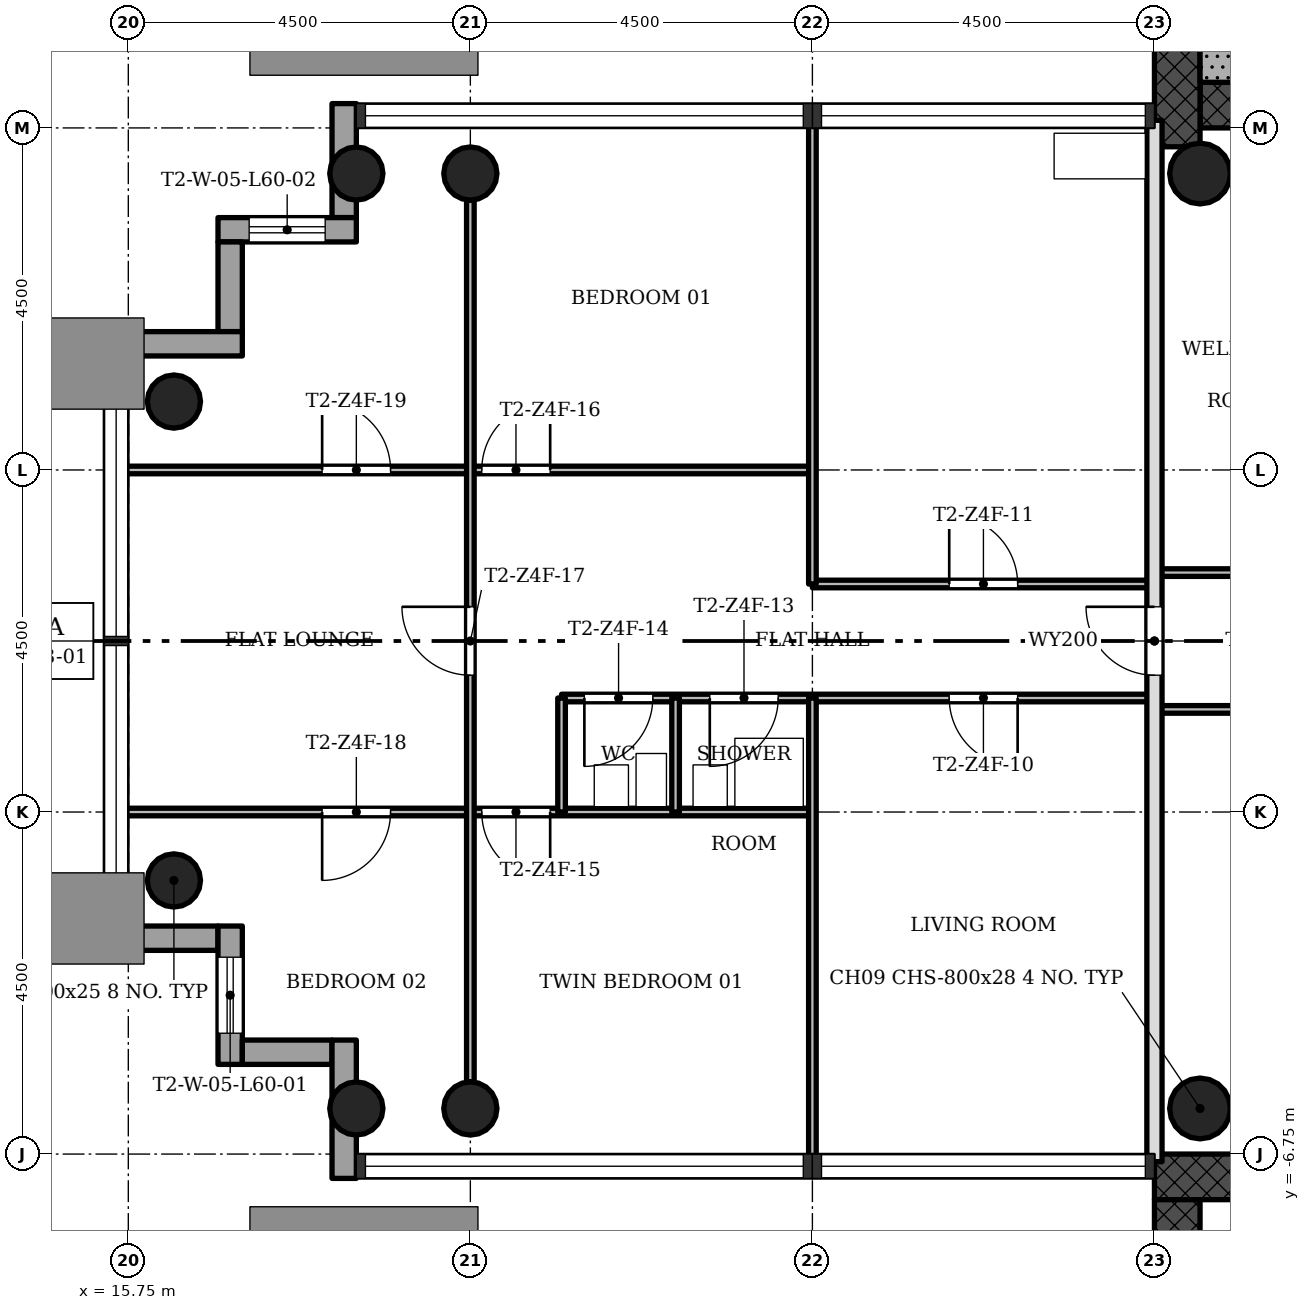
"""IFC4 building model, lengths in metres.
Left out: names, types, materials, properties, quantities, classifications, styles, units other than length and angle.
Written with IfcOpenShell. Run it as: python <this file> out.ifc"""

import sys

from ifc_helpers import new_model, si_unit, direction, frame, frame_2d, origin, origin_2d, place, context, subcontext, project, spatial, rectangle, hollow_circle, extrude, element, fill, save


model = new_model("IFC4")
c1 = context("Model", 3, precision=1e-05, world=origin(), true_north=direction((0.0, 1.0)))
c2 = subcontext(c1, "Body", "Model", "MODEL_VIEW")
j1 = project(units=[si_unit("LENGTHUNIT", "METRE"), si_unit("PLANEANGLEUNIT", "RADIAN")], contexts=[c1])
p1 = place(None, origin())
s1 = spatial("IfcSite", under=j1, at=p1, CompositionType="ELEMENT")
p2 = place(p1, origin())
s2 = spatial("IfcBuilding", under=s1, at=p2, CompositionType="ELEMENT")
p3 = place(p2, frame((0.0, 0.0, 216.4)))
s3 = spatial("IfcBuildingStorey", under=s2, at=p3, CompositionType="ELEMENT", Elevation=216.4)
p4 = place(p3, frame((29.85, 7.05, 0.0), z_axis=(0.0, 0.0, 1.0), x_axis=(1.0, 0.0, 0.0)))
e1 = element("IfcWall", 1, at=p4, inside=s3, PredefinedType="SHEAR", context=c2, shape_type="SweptSolid", body=[
    extrude(rectangle(XDim=12.9, YDim=0.6, at=frame_2d((6.45, 0.0))), origin(), (0.0, 0.0, 1.0), 3.4),
])
p5 = place(p4, frame((5.25, 0.0, 0.0)))
e2 = element("IfcOpeningElement", 2, at=p5, cuts=e1, PredefinedType="OPENING", context=c2, shape_type="SweptSolid", body=[
    extrude(rectangle(XDim=1.8, YDim=2.1, at=frame_2d((0.9, 1.05))), frame((0.0, 0.31, 0.0), z_axis=(0.0, -1.0, 0.0), x_axis=(1.0, 0.0, 0.0)), (0.0, 0.0, 1.0), 0.62),
])
p6 = place(p3, frame((29.55, 15.15, 0.0), z_axis=(0.0, 0.0, 1.0), x_axis=(0.0, -1.0, 0.0)))
e3 = element("IfcWall", 3, at=p6, inside=s3, PredefinedType="SHEAR", context=c2, shape_type="SweptSolid", body=[
    extrude(rectangle(XDim=8.648, YDim=0.6, at=frame_2d((4.324, 0.0))), origin(), (0.0, 0.0, 1.0), 3.4),
])
p7 = place(p3, frame((42.15, -7.05, 0.0), z_axis=(0.0, 0.0, 1.0), x_axis=(-1.0, 0.0, 0.0)))
e4 = element("IfcWall", 4, at=p7, inside=s3, PredefinedType="SHEAR", context=c2, shape_type="SweptSolid", body=[
    extrude(rectangle(XDim=12.9, YDim=0.6, at=frame_2d((6.45, 0.0))), origin(), (0.0, 0.0, 1.0), 3.4),
])
p8 = place(p7, frame((5.25, 0.0, 0.0)))
e5 = element("IfcOpeningElement", 5, at=p8, cuts=e4, PredefinedType="OPENING", context=c2, shape_type="SweptSolid", body=[
    extrude(rectangle(XDim=1.8, YDim=2.1, at=frame_2d((0.9, 1.05))), frame((0.0, 0.31, 0.0), z_axis=(0.0, -1.0, 0.0), x_axis=(1.0, 0.0, 0.0)), (0.0, 0.0, 1.0), 0.62),
])
p9 = place(p3, frame((29.55, -7.35, 0.0), z_axis=(0.0, 0.0, 1.0), x_axis=(0.0, -1.0, 0.0)))
e6 = element("IfcWall", 6, at=p9, inside=s3, PredefinedType="SHEAR", context=c2, shape_type="SweptSolid", body=[
    extrude(rectangle(XDim=8.4, YDim=0.6, at=frame_2d((4.2, 0.0))), origin(), (0.0, 0.0, 1.0), 3.4),
])
for number, where, z_axis, x_axis in (
    (7, (20.25, 6.15, 0.0), (0.0, 0.0, 1.0), (1.0, 0.0, 0.0)),
    (8, (20.25, -6.15, 0.0), (0.0, 0.0, 1.0), (1.0, 0.0, 0.0)),
    (9, (18.75, 6.15, 0.0), (0.0, 0.0, 1.0), (1.0, 0.0, 0.0)),
    (10, (18.75, -6.15, 0.0), (0.0, 0.0, 1.0), (1.0, 0.0, 0.0)),
    (11, (16.35, 3.15, 0.0), (0.0, 0.0, 1.0), (1.0, 0.0, 0.0)),
    (12, (16.35, -3.15, 0.0), (0.0, 0.0, 1.0), (1.0, 0.0, 0.0)),
):
    element("IfcColumn", number, at=place(p3, frame(where, z_axis=z_axis, x_axis=x_axis)), inside=s3, PredefinedType="COLUMN", context=c2, shape_type="SweptSolid", body=[
        extrude(hollow_circle(Radius=0.35, WallThickness=0.025, at=origin_2d()), origin(), (0.0, 0.0, 1.0), 3.4),
    ])
for number, where, z_axis, x_axis in (
    (13, (29.85, 6.15, 0.0), (0.0, 0.0, 1.0), (1.0, 0.0, 0.0)),
    (14, (29.85, -6.15, 0.0), (0.0, 0.0, 1.0), (1.0, 0.0, 0.0)),
):
    element("IfcColumn", number, at=place(p3, frame(where, z_axis=z_axis, x_axis=x_axis)), inside=s3, PredefinedType="COLUMN", context=c2, shape_type="SweptSolid", body=[
        extrude(hollow_circle(Radius=0.4, WallThickness=0.028, at=origin_2d()), origin(), (0.0, 0.0, 1.0), 3.4),
    ])
p10 = place(p3, frame((18.59, 7.07, -0.3), z_axis=(0.0, 0.0, 1.0), x_axis=(0.0, -1.0, 0.0)))
e15 = element("IfcWall", 15, at=p10, inside=s3, PredefinedType="STANDARD", context=c2, shape_type="SweptSolid", body=[
    extrude(rectangle(XDim=1.5, YDim=0.32, at=frame_2d((0.75, 0.0))), origin(), (0.0, 0.0, 1.0), 3.4),
])
p11 = place(p3, frame((18.75, 5.41, -0.3), z_axis=(0.0, 0.0, 1.0), x_axis=(-1.0, 0.0, 0.0)))
e16 = element("IfcWall", 16, at=p11, inside=s3, PredefinedType="STANDARD", context=c2, shape_type="SweptSolid", body=[
    extrude(rectangle(XDim=1.82, YDim=0.32, at=frame_2d((0.91, 0.0))), origin(), (0.0, 0.0, 1.0), 3.4),
])
p12 = place(p11, frame((0.41, 0.0, 1.2)))
e17 = element("IfcOpeningElement", 17, at=p12, cuts=e16, PredefinedType="OPENING", context=c2, shape_type="SweptSolid", body=[
    extrude(rectangle(XDim=1.0, YDim=1.5, at=frame_2d((0.5, 0.75))), frame((0.0, 0.17, 0.0), z_axis=(0.0, -1.0, 0.0), x_axis=(1.0, 0.0, 0.0)), (0.0, 0.0, 1.0), 0.34),
])
p13 = place(p3, frame((17.09, 5.25, -0.3), z_axis=(0.0, 0.0, 1.0), x_axis=(0.0, -1.0, 0.0)))
e18 = element("IfcWall", 18, at=p13, inside=s3, PredefinedType="STANDARD", context=c2, shape_type="SweptSolid", body=[
    extrude(rectangle(XDim=1.18, YDim=0.32, at=frame_2d((0.59, 0.0))), origin(), (0.0, 0.0, 1.0), 3.4),
])
p14 = place(p3, frame((17.25, 3.91, -0.3), z_axis=(0.0, 0.0, 1.0), x_axis=(-1.0, 0.0, 0.0)))
e19 = element("IfcWall", 19, at=p14, inside=s3, PredefinedType="STANDARD", context=c2, shape_type="SweptSolid", body=[
    extrude(rectangle(XDim=1.82, YDim=0.32, at=frame_2d((0.91, 0.0))), origin(), (0.0, 0.0, 1.0), 3.4),
])
p15 = place(p3, frame((15.43, -3.91, -0.3), z_axis=(0.0, 0.0, 1.0), x_axis=(1.0, 0.0, 0.0)))
e20 = element("IfcWall", 20, at=p15, inside=s3, PredefinedType="STANDARD", context=c2, shape_type="SweptSolid", body=[
    extrude(rectangle(XDim=1.5, YDim=0.32, at=frame_2d((0.75, 0.0))), origin(), (0.0, 0.0, 1.0), 3.4),
])
p16 = place(p3, frame((17.09, -3.75, -0.3), z_axis=(0.0, 0.0, 1.0), x_axis=(0.0, -1.0, 0.0)))
e21 = element("IfcWall", 21, at=p16, inside=s3, PredefinedType="STANDARD", context=c2, shape_type="SweptSolid", body=[
    extrude(rectangle(XDim=1.82, YDim=0.32, at=frame_2d((0.91, 0.0))), origin(), (0.0, 0.0, 1.0), 3.4),
])
p17 = place(p16, frame((0.41, 0.0, 1.2)))
e22 = element("IfcOpeningElement", 22, at=p17, cuts=e21, PredefinedType="OPENING", context=c2, shape_type="SweptSolid", body=[
    extrude(rectangle(XDim=1.0, YDim=1.5, at=frame_2d((0.5, 0.75))), frame((0.0, 0.17, 0.0), z_axis=(0.0, -1.0, 0.0), x_axis=(1.0, 0.0, 0.0)), (0.0, 0.0, 1.0), 0.34),
])
p18 = place(p3, frame((17.25, -5.41, -0.3), z_axis=(0.0, 0.0, 1.0), x_axis=(1.0, 0.0, 0.0)))
e23 = element("IfcWall", 23, at=p18, inside=s3, PredefinedType="STANDARD", context=c2, shape_type="SweptSolid", body=[
    extrude(rectangle(XDim=1.18, YDim=0.32, at=frame_2d((0.59, 0.0))), origin(), (0.0, 0.0, 1.0), 3.4),
])
p19 = place(p3, frame((18.59, -5.25, -0.3), z_axis=(0.0, 0.0, 1.0), x_axis=(0.0, -1.0, 0.0)))
e24 = element("IfcWall", 24, at=p19, inside=s3, PredefinedType="STANDARD", context=c2, shape_type="SweptSolid", body=[
    extrude(rectangle(XDim=1.82, YDim=0.32, at=frame_2d((0.91, 0.0))), origin(), (0.0, 0.0, 1.0), 3.4),
])
p20 = place(p3, frame((24.75, -2.25, 0.0), z_axis=(0.0, 0.0, 1.0), x_axis=(-1.0, 0.0, 0.0)))
e25 = element("IfcWall", 25, at=p20, inside=s3, PredefinedType="PARTITIONING", context=c2, shape_type="SweptSolid", body=[
    extrude(rectangle(XDim=9.1, YDim=0.1, at=frame_2d((4.55, 0.0))), origin(), (0.0, 0.0, 1.0), 3.0),
])
p21 = place(p20, frame((3.45, 0.0, 0.0)))
e26 = element("IfcOpeningElement", 26, at=p21, cuts=e25, PredefinedType="OPENING", context=c2, shape_type="SweptSolid", body=[
    extrude(rectangle(XDim=0.9, YDim=2.1, at=frame_2d((0.45, 1.05))), frame((0.0, 0.06, 0.0), z_axis=(0.0, -1.0, 0.0), x_axis=(1.0, 0.0, 0.0)), (0.0, 0.0, 1.0), 0.12),
])
p22 = place(p20, frame((5.55, 0.0, 0.0)))
e27 = element("IfcOpeningElement", 27, at=p22, cuts=e25, PredefinedType="OPENING", context=c2, shape_type="SweptSolid", body=[
    extrude(rectangle(XDim=0.9, YDim=2.1, at=frame_2d((0.45, 1.05))), frame((0.0, 0.06, 0.0), z_axis=(0.0, -1.0, 0.0), x_axis=(1.0, 0.0, 0.0)), (0.0, 0.0, 1.0), 0.12),
])
p23 = place(p3, frame((31.5, -0.9, 0.0), z_axis=(0.0, 0.0, 1.0), x_axis=(-1.0, 0.0, 0.0)))
e28 = element("IfcWall", 28, at=p23, inside=s3, PredefinedType="PARTITIONING", context=c2, shape_type="SweptSolid", body=[
    extrude(rectangle(XDim=2.25, YDim=0.1, at=frame_2d((1.125, 0.0))), origin(), (0.0, 0.0, 1.0), 3.0),
])
p24 = place(p3, frame((29.25, -0.75, 0.0), z_axis=(0.0, 0.0, 1.0), x_axis=(-1.0, 0.0, 0.0)))
e29 = element("IfcWall", 29, at=p24, inside=s3, PredefinedType="PARTITIONING", context=c2, shape_type="SweptSolid", body=[
    extrude(rectangle(XDim=7.8, YDim=0.1, at=frame_2d((3.9, 0.0))), origin(), (0.0, 0.0, 1.0), 3.0),
])
p25 = place(p24, frame((1.8, 0.0, 0.0)))
e30 = element("IfcOpeningElement", 30, at=p25, cuts=e29, PredefinedType="OPENING", context=c2, shape_type="SweptSolid", body=[
    extrude(rectangle(XDim=0.9, YDim=2.1, at=frame_2d((0.45, 1.05))), frame((0.0, 0.06, 0.0), z_axis=(0.0, -1.0, 0.0), x_axis=(1.0, 0.0, 0.0)), (0.0, 0.0, 1.0), 0.12),
])
p26 = place(p24, frame((4.95, 0.0, 0.0)))
e31 = element("IfcOpeningElement", 31, at=p26, cuts=e29, PredefinedType="OPENING", context=c2, shape_type="SweptSolid", body=[
    extrude(rectangle(XDim=0.9, YDim=2.1, at=frame_2d((0.45, 1.05))), frame((0.0, 0.06, 0.0), z_axis=(0.0, -1.0, 0.0), x_axis=(1.0, 0.0, 0.0)), (0.0, 0.0, 1.0), 0.12),
])
p27 = place(p24, frame((6.6, 0.0, 0.0)))
e32 = element("IfcOpeningElement", 32, at=p27, cuts=e29, PredefinedType="OPENING", context=c2, shape_type="SweptSolid", body=[
    extrude(rectangle(XDim=0.9, YDim=2.1, at=frame_2d((0.45, 1.05))), frame((0.0, 0.06, 0.0), z_axis=(0.0, -1.0, 0.0), x_axis=(1.0, 0.0, 0.0)), (0.0, 0.0, 1.0), 0.12),
])
p28 = place(p3, frame((29.25, 0.75, 0.0), z_axis=(0.0, 0.0, 1.0), x_axis=(-1.0, 0.0, 0.0)))
e33 = element("IfcWall", 33, at=p28, inside=s3, PredefinedType="PARTITIONING", context=c2, shape_type="SweptSolid", body=[
    extrude(rectangle(XDim=4.5, YDim=0.1, at=frame_2d((2.25, 0.0))), origin(), (0.0, 0.0, 1.0), 3.0),
])
p29 = place(p28, frame((1.8, 0.0, 0.0)))
e34 = element("IfcOpeningElement", 34, at=p29, cuts=e33, PredefinedType="OPENING", context=c2, shape_type="SweptSolid", body=[
    extrude(rectangle(XDim=0.9, YDim=2.1, at=frame_2d((0.45, 1.05))), frame((0.0, 0.06, 0.0), z_axis=(0.0, -1.0, 0.0), x_axis=(1.0, 0.0, 0.0)), (0.0, 0.0, 1.0), 0.12),
])
p30 = place(p3, frame((31.5, 0.9, 0.0), z_axis=(0.0, 0.0, 1.0), x_axis=(-1.0, 0.0, 0.0)))
e35 = element("IfcWall", 35, at=p30, inside=s3, PredefinedType="PARTITIONING", context=c2, shape_type="SweptSolid", body=[
    extrude(rectangle(XDim=2.25, YDim=0.1, at=frame_2d((1.125, 0.0))), origin(), (0.0, 0.0, 1.0), 3.0),
])
p31 = place(p3, frame((24.75, 2.25, 0.0), z_axis=(0.0, 0.0, 1.0), x_axis=(-1.0, 0.0, 0.0)))
e36 = element("IfcWall", 36, at=p31, inside=s3, PredefinedType="PARTITIONING", context=c2, shape_type="SweptSolid", body=[
    extrude(rectangle(XDim=9.1, YDim=0.1, at=frame_2d((4.55, 0.0))), origin(), (0.0, 0.0, 1.0), 3.0),
])
p32 = place(p31, frame((3.45, 0.0, 0.0)))
e37 = element("IfcOpeningElement", 37, at=p32, cuts=e36, PredefinedType="OPENING", context=c2, shape_type="SweptSolid", body=[
    extrude(rectangle(XDim=0.9, YDim=2.1, at=frame_2d((0.45, 1.05))), frame((0.0, 0.06, 0.0), z_axis=(0.0, -1.0, 0.0), x_axis=(1.0, 0.0, 0.0)), (0.0, 0.0, 1.0), 0.12),
])
p33 = place(p31, frame((5.55, 0.0, 0.0)))
e38 = element("IfcOpeningElement", 38, at=p33, cuts=e36, PredefinedType="OPENING", context=c2, shape_type="SweptSolid", body=[
    extrude(rectangle(XDim=0.9, YDim=2.1, at=frame_2d((0.45, 1.05))), frame((0.0, 0.06, 0.0), z_axis=(0.0, -1.0, 0.0), x_axis=(1.0, 0.0, 0.0)), (0.0, 0.0, 1.0), 0.12),
])
p34 = place(p3, frame((29.25, -6.85, 0.0), z_axis=(0.0, 0.0, 1.0), x_axis=(0.0, 1.0, 0.0)))
e39 = element("IfcWall", 39, at=p34, inside=s3, PredefinedType="SOLIDWALL", context=c2, shape_type="SweptSolid", body=[
    extrude(rectangle(XDim=13.7, YDim=0.2, at=frame_2d((6.85, 0.0))), origin(), (0.0, 0.0, 1.0), 3.0),
])
p35 = place(p34, frame((6.4, 0.0, 0.0)))
e40 = element("IfcOpeningElement", 40, at=p35, cuts=e39, PredefinedType="OPENING", context=c2, shape_type="SweptSolid", body=[
    extrude(rectangle(XDim=0.9, YDim=2.1, at=frame_2d((0.45, 1.05))), frame((0.0, 0.11, 0.0), z_axis=(0.0, -1.0, 0.0), x_axis=(1.0, 0.0, 0.0)), (0.0, 0.0, 1.0), 0.22),
])
for number, where, z_axis, x_axis in (
    (41, (24.75, -6.85, 0.0), (0.0, 0.0, 1.0), (0.0, 1.0, 0.0)),
    (42, (24.75, 0.75, 0.0), (0.0, 0.0, 1.0), (0.0, 1.0, 0.0)),
):
    element("IfcWall", number, at=place(p3, frame(where, z_axis=z_axis, x_axis=x_axis)), inside=s3, PredefinedType="PARTITIONING", context=c2, shape_type="SweptSolid", body=[
        extrude(rectangle(XDim=6.1, YDim=0.1, at=frame_2d((3.05, 0.0))), origin(), (0.0, 0.0, 1.0), 3.0),
    ])
for number, where, z_axis, x_axis in (
    (43, (22.95, -2.25, 0.0), (0.0, 0.0, 1.0), (0.0, 1.0, 0.0)),
    (44, (21.45, -2.25, 0.0), (0.0, 0.0, 1.0), (0.0, 1.0, 0.0)),
):
    element("IfcWall", number, at=place(p3, frame(where, z_axis=z_axis, x_axis=x_axis)), inside=s3, PredefinedType="PARTITIONING", context=c2, shape_type="SweptSolid", body=[
        extrude(rectangle(XDim=1.5, YDim=0.1, at=frame_2d((0.75, 0.0))), origin(), (0.0, 0.0, 1.0), 3.0),
    ])
p36 = place(p3, frame((20.25, -5.8, 0.0), z_axis=(0.0, 0.0, 1.0), x_axis=(0.0, 1.0, 0.0)))
e45 = element("IfcWall", 45, at=p36, inside=s3, PredefinedType="PARTITIONING", context=c2, shape_type="SweptSolid", body=[
    extrude(rectangle(XDim=11.6, YDim=0.1, at=frame_2d((5.8, 0.0))), origin(), (0.0, 0.0, 1.0), 3.0),
])
p37 = place(p36, frame((5.35, 0.0, 0.0)))
e46 = element("IfcOpeningElement", 46, at=p37, cuts=e45, PredefinedType="OPENING", context=c2, shape_type="SweptSolid", body=[
    extrude(rectangle(XDim=0.9, YDim=2.1, at=frame_2d((0.45, 1.05))), frame((0.0, 0.06, 0.0), z_axis=(0.0, -1.0, 0.0), x_axis=(1.0, 0.0, 0.0)), (0.0, 0.0, 1.0), 0.12),
])
p38 = place(p3, frame((34.15, 7.65, 0.0), z_axis=(0.0, 0.0, 1.0), x_axis=(-1.0, 0.0, 0.0)))
e47 = element("IfcWall", 47, at=p38, inside=s3, PredefinedType="SHEAR", context=c2, shape_type="SweptSolid", body=[
    extrude(rectangle(XDim=4.3, YDim=0.6, at=frame_2d((2.15, 0.0))), origin(), (0.0, 0.0, 1.0), 3.4),
])
p39 = place(p25, origin())
e48 = element("IfcDoor", 48, at=p39, inside=s3, OperationType="SINGLE_SWING_RIGHT", PredefinedType="DOOR", context=c2, shape_type="SweptSolid", body=[
    extrude(rectangle(XDim=0.9, YDim=2.1, at=frame_2d((0.45, 1.05))), frame((0.0, 0.025, 0.0), z_axis=(0.0, -1.0, 0.0), x_axis=(1.0, 0.0, 0.0)), (0.0, 0.0, 1.0), 0.05),
])
fill(e30, e48)
p40 = place(p29, origin())
e49 = element("IfcDoor", 49, at=p40, inside=s3, OperationType="SINGLE_SWING_RIGHT", PredefinedType="DOOR", context=c2, shape_type="SweptSolid", body=[
    extrude(rectangle(XDim=0.9, YDim=2.1, at=frame_2d((0.45, 1.05))), frame((0.0, 0.025, 0.0), z_axis=(0.0, -1.0, 0.0), x_axis=(1.0, 0.0, 0.0)), (0.0, 0.0, 1.0), 0.05),
])
fill(e34, e49)
p41 = place(p35, origin())
e50 = element("IfcDoor", 50, at=p41, inside=s3, OperationType="SINGLE_SWING_LEFT", PredefinedType="DOOR", context=c2, shape_type="SweptSolid", body=[
    extrude(rectangle(XDim=0.9, YDim=2.1, at=frame_2d((0.45, 1.05))), frame((0.0, 0.025, 0.0), z_axis=(0.0, -1.0, 0.0), x_axis=(1.0, 0.0, 0.0)), (0.0, 0.0, 1.0), 0.05),
])
fill(e40, e50)
p42 = place(p26, origin())
e51 = element("IfcDoor", 51, at=p42, inside=s3, OperationType="SINGLE_SWING_LEFT", PredefinedType="DOOR", context=c2, shape_type="SweptSolid", body=[
    extrude(rectangle(XDim=0.9, YDim=2.1, at=frame_2d((0.45, 1.05))), frame((0.0, 0.025, 0.0), z_axis=(0.0, -1.0, 0.0), x_axis=(1.0, 0.0, 0.0)), (0.0, 0.0, 1.0), 0.05),
])
fill(e31, e51)
p43 = place(p27, origin())
e52 = element("IfcDoor", 52, at=p43, inside=s3, OperationType="SINGLE_SWING_LEFT", PredefinedType="DOOR", context=c2, shape_type="SweptSolid", body=[
    extrude(rectangle(XDim=0.9, YDim=2.1, at=frame_2d((0.45, 1.05))), frame((0.0, 0.025, 0.0), z_axis=(0.0, -1.0, 0.0), x_axis=(1.0, 0.0, 0.0)), (0.0, 0.0, 1.0), 0.05),
])
fill(e32, e52)
p44 = place(p21, origin())
e53 = element("IfcDoor", 53, at=p44, inside=s3, OperationType="SINGLE_SWING_RIGHT", PredefinedType="DOOR", context=c2, shape_type="SweptSolid", body=[
    extrude(rectangle(XDim=0.9, YDim=2.1, at=frame_2d((0.45, 1.05))), frame((0.0, 0.025, 0.0), z_axis=(0.0, -1.0, 0.0), x_axis=(1.0, 0.0, 0.0)), (0.0, 0.0, 1.0), 0.05),
])
fill(e26, e53)
p45 = place(p32, origin())
e54 = element("IfcDoor", 54, at=p45, inside=s3, OperationType="SINGLE_SWING_LEFT", PredefinedType="DOOR", context=c2, shape_type="SweptSolid", body=[
    extrude(rectangle(XDim=0.9, YDim=2.1, at=frame_2d((0.45, 1.05))), frame((0.0, 0.025, 0.0), z_axis=(0.0, -1.0, 0.0), x_axis=(1.0, 0.0, 0.0)), (0.0, 0.0, 1.0), 0.05),
])
fill(e37, e54)
p46 = place(p37, origin())
e55 = element("IfcDoor", 55, at=p46, inside=s3, OperationType="SINGLE_SWING_LEFT", PredefinedType="DOOR", context=c2, shape_type="SweptSolid", body=[
    extrude(rectangle(XDim=0.9, YDim=2.1, at=frame_2d((0.45, 1.05))), frame((0.0, 0.025, 0.0), z_axis=(0.0, -1.0, 0.0), x_axis=(1.0, 0.0, 0.0)), (0.0, 0.0, 1.0), 0.05),
])
fill(e46, e55)
p47 = place(p22, origin())
e56 = element("IfcDoor", 56, at=p47, inside=s3, OperationType="SINGLE_SWING_LEFT", PredefinedType="DOOR", context=c2, shape_type="SweptSolid", body=[
    extrude(rectangle(XDim=0.9, YDim=2.1, at=frame_2d((0.45, 1.05))), frame((0.0, 0.025, 0.0), z_axis=(0.0, -1.0, 0.0), x_axis=(1.0, 0.0, 0.0)), (0.0, 0.0, 1.0), 0.05),
])
fill(e27, e56)
p48 = place(p33, origin())
e57 = element("IfcDoor", 57, at=p48, inside=s3, OperationType="SINGLE_SWING_RIGHT", PredefinedType="DOOR", context=c2, shape_type="SweptSolid", body=[
    extrude(rectangle(XDim=0.9, YDim=2.1, at=frame_2d((0.45, 1.05))), frame((0.0, 0.025, 0.0), z_axis=(0.0, -1.0, 0.0), x_axis=(1.0, 0.0, 0.0)), (0.0, 0.0, 1.0), 0.05),
])
fill(e38, e57)
p49 = place(p17, origin())
e58 = element("IfcWindow", 58, at=p49, inside=s3, PartitioningType="SINGLE_PANEL", PredefinedType="WINDOW", context=c2, shape_type="SweptSolid", body=[
    extrude(rectangle(XDim=1.0, YDim=1.5, at=frame_2d((0.5, 0.75))), frame((0.0, 0.03, 0.0), z_axis=(0.0, -1.0, 0.0), x_axis=(1.0, 0.0, 0.0)), (0.0, 0.0, 1.0), 0.06),
])
fill(e22, e58)
p50 = place(p12, origin())
e59 = element("IfcWindow", 59, at=p50, inside=s3, PartitioningType="SINGLE_PANEL", PredefinedType="WINDOW", context=c2, shape_type="SweptSolid", body=[
    extrude(rectangle(XDim=1.0, YDim=1.5, at=frame_2d((0.5, 0.75))), frame((0.0, 0.03, 0.0), z_axis=(0.0, -1.0, 0.0), x_axis=(1.0, 0.0, 0.0)), (0.0, 0.0, 1.0), 0.06),
])
fill(e17, e59)
save(model, sys.argv[1])
